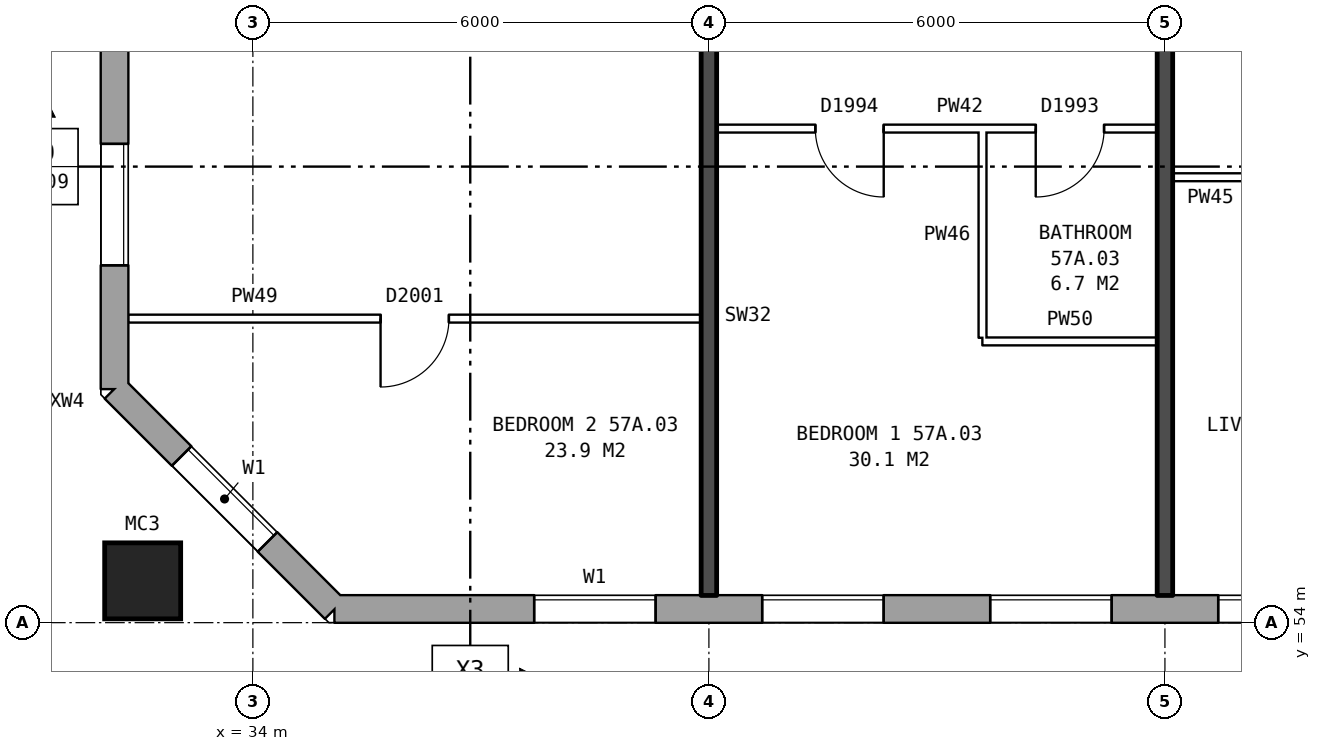
"""IFC4 building model, lengths in metres.
Left out: names, types, materials, properties, quantities, classifications, styles, units other than length and angle.
Written with IfcOpenShell. Run it as: python <this file> out.ifc"""

import sys

from ifc_helpers import new_model, si_unit, direction, frame, frame_2d, origin, origin_2d, place, context, subcontext, project, spatial, rectangle, hollow_rectangle, extrude, element, fill, save


model = new_model("IFC4")
c1 = context("Model", 3, precision=1e-05, world=origin(), true_north=direction((0.0, 1.0)))
c2 = subcontext(c1, "Body", "Model", "MODEL_VIEW")
j1 = project(units=[si_unit("LENGTHUNIT", "METRE"), si_unit("PLANEANGLEUNIT", "RADIAN")], contexts=[c1])
p1 = place(None, origin())
s1 = spatial("IfcSite", under=j1, at=p1, CompositionType="ELEMENT")
p2 = place(p1, origin())
s2 = spatial("IfcBuilding", under=s1, at=p2, CompositionType="ELEMENT")
p3 = place(p2, frame((0.0, 0.0, 202.8)))
s3 = spatial("IfcBuildingStorey", under=s2, at=p3, CompositionType="ELEMENT", Elevation=202.8)
p4 = place(p3, frame((32.55, 54.55, 0.0), z_axis=(0.0, 0.0, 1.0), x_axis=(1.0, 0.0, 0.0)))
e1 = element("IfcColumn", 1, at=p4, inside=s3, PredefinedType="COLUMN", context=c2, shape_type="SweptSolid", body=[
    extrude(hollow_rectangle(XDim=1.0, YDim=1.0, WallThickness=0.055, at=origin_2d()), origin(), (0.0, 0.0, 1.0), 3.1),
])
p5 = place(p3, frame((32.18, 57.075, 0.0), z_axis=(0.0, 0.0, 1.0), x_axis=(0.707106781187, -0.707106781187, 0.0)))
e2 = element("IfcWall", 2, at=p5, inside=s3, PredefinedType="STANDARD", context=c2, shape_type="SweptSolid", body=[
    extrude(rectangle(XDim=4.094, YDim=0.36, at=frame_2d((2.047, 0.0))), origin(), (0.0, 0.0, 1.0), 2.85),
])
p6 = place(p5, frame((1.247, 0.0, 0.8)))
e3 = element("IfcOpeningElement", 3, at=p6, cuts=e2, PredefinedType="OPENING", context=c2, shape_type="SweptSolid", body=[
    extrude(rectangle(XDim=1.6, YDim=1.8, at=frame_2d((0.8, 0.9))), frame((0.0, 0.19, 0.0), z_axis=(0.0, -1.0, 0.0), x_axis=(1.0, 0.0, 0.0)), (0.0, 0.0, 1.0), 0.38),
])
p7 = place(p3, frame((35.075, 54.18, 0.0), z_axis=(0.0, 0.0, 1.0), x_axis=(1.0, 0.0, 0.0)))
e4 = element("IfcWall", 4, at=p7, inside=s3, PredefinedType="STANDARD", context=c2, shape_type="SweptSolid", body=[
    extrude(rectangle(XDim=39.875, YDim=0.36, at=frame_2d((19.938, 0.0))), origin(), (0.0, 0.0, 1.0), 2.85),
])
p8 = place(p7, frame((2.625, 0.0, 0.8)))
e5 = element("IfcOpeningElement", 5, at=p8, cuts=e4, PredefinedType="OPENING", context=c2, shape_type="SweptSolid", body=[
    extrude(rectangle(XDim=1.6, YDim=1.8, at=frame_2d((0.8, 0.9))), frame((0.0, 0.19, 0.0), z_axis=(0.0, -1.0, 0.0), x_axis=(1.0, 0.0, 0.0)), (0.0, 0.0, 1.0), 0.38),
])
p9 = place(p7, frame((5.625, 0.0, 0.8)))
e6 = element("IfcOpeningElement", 6, at=p9, cuts=e4, PredefinedType="OPENING", context=c2, shape_type="SweptSolid", body=[
    extrude(rectangle(XDim=1.6, YDim=1.8, at=frame_2d((0.8, 0.9))), frame((0.0, 0.19, 0.0), z_axis=(0.0, -1.0, 0.0), x_axis=(1.0, 0.0, 0.0)), (0.0, 0.0, 1.0), 0.38),
])
p10 = place(p7, frame((8.625, 0.0, 0.8)))
e7 = element("IfcOpeningElement", 7, at=p10, cuts=e4, PredefinedType="OPENING", context=c2, shape_type="SweptSolid", body=[
    extrude(rectangle(XDim=1.6, YDim=1.8, at=frame_2d((0.8, 0.9))), frame((0.0, 0.19, 0.0), z_axis=(0.0, -1.0, 0.0), x_axis=(1.0, 0.0, 0.0)), (0.0, 0.0, 1.0), 0.38),
])
p11 = place(p7, frame((11.625, 0.0, 0.8)))
e8 = element("IfcOpeningElement", 8, at=p11, cuts=e4, PredefinedType="OPENING", context=c2, shape_type="SweptSolid", body=[
    extrude(rectangle(XDim=1.6, YDim=1.8, at=frame_2d((0.8, 0.9))), frame((0.0, 0.19, 0.0), z_axis=(0.0, -1.0, 0.0), x_axis=(1.0, 0.0, 0.0)), (0.0, 0.0, 1.0), 0.38),
])
p12 = place(p7, frame((14.625, 0.0, 0.8)))
e9 = element("IfcOpeningElement", 9, at=p12, cuts=e4, PredefinedType="OPENING", context=c2, shape_type="SweptSolid", body=[
    extrude(rectangle(XDim=1.6, YDim=1.8, at=frame_2d((0.8, 0.9))), frame((0.0, 0.19, 0.0), z_axis=(0.0, -1.0, 0.0), x_axis=(1.0, 0.0, 0.0)), (0.0, 0.0, 1.0), 0.38),
])
p13 = place(p7, frame((17.625, 0.0, 0.8)))
e10 = element("IfcOpeningElement", 10, at=p13, cuts=e4, PredefinedType="OPENING", context=c2, shape_type="SweptSolid", body=[
    extrude(rectangle(XDim=1.6, YDim=1.8, at=frame_2d((0.8, 0.9))), frame((0.0, 0.19, 0.0), z_axis=(0.0, -1.0, 0.0), x_axis=(1.0, 0.0, 0.0)), (0.0, 0.0, 1.0), 0.38),
])
p14 = place(p7, frame((20.625, 0.0, 0.8)))
e11 = element("IfcOpeningElement", 11, at=p14, cuts=e4, PredefinedType="OPENING", context=c2, shape_type="SweptSolid", body=[
    extrude(rectangle(XDim=1.6, YDim=1.8, at=frame_2d((0.8, 0.9))), frame((0.0, 0.19, 0.0), z_axis=(0.0, -1.0, 0.0), x_axis=(1.0, 0.0, 0.0)), (0.0, 0.0, 1.0), 0.38),
])
p15 = place(p7, frame((23.625, 0.0, 0.8)))
e12 = element("IfcOpeningElement", 12, at=p15, cuts=e4, PredefinedType="OPENING", context=c2, shape_type="SweptSolid", body=[
    extrude(rectangle(XDim=1.6, YDim=1.8, at=frame_2d((0.8, 0.9))), frame((0.0, 0.19, 0.0), z_axis=(0.0, -1.0, 0.0), x_axis=(1.0, 0.0, 0.0)), (0.0, 0.0, 1.0), 0.38),
])
p16 = place(p7, frame((26.625, 0.0, 0.8)))
e13 = element("IfcOpeningElement", 13, at=p16, cuts=e4, PredefinedType="OPENING", context=c2, shape_type="SweptSolid", body=[
    extrude(rectangle(XDim=1.6, YDim=1.8, at=frame_2d((0.8, 0.9))), frame((0.0, 0.19, 0.0), z_axis=(0.0, -1.0, 0.0), x_axis=(1.0, 0.0, 0.0)), (0.0, 0.0, 1.0), 0.38),
])
p17 = place(p7, frame((29.625, 0.0, 0.8)))
e14 = element("IfcOpeningElement", 14, at=p17, cuts=e4, PredefinedType="OPENING", context=c2, shape_type="SweptSolid", body=[
    extrude(rectangle(XDim=1.6, YDim=1.8, at=frame_2d((0.8, 0.9))), frame((0.0, 0.19, 0.0), z_axis=(0.0, -1.0, 0.0), x_axis=(1.0, 0.0, 0.0)), (0.0, 0.0, 1.0), 0.38),
])
p18 = place(p7, frame((32.625, 0.0, 0.8)))
e15 = element("IfcOpeningElement", 15, at=p18, cuts=e4, PredefinedType="OPENING", context=c2, shape_type="SweptSolid", body=[
    extrude(rectangle(XDim=1.6, YDim=1.8, at=frame_2d((0.8, 0.9))), frame((0.0, 0.19, 0.0), z_axis=(0.0, -1.0, 0.0), x_axis=(1.0, 0.0, 0.0)), (0.0, 0.0, 1.0), 0.38),
])
p19 = place(p7, frame((35.625, 0.0, 0.8)))
e16 = element("IfcOpeningElement", 16, at=p19, cuts=e4, PredefinedType="OPENING", context=c2, shape_type="SweptSolid", body=[
    extrude(rectangle(XDim=1.6, YDim=1.8, at=frame_2d((0.8, 0.9))), frame((0.0, 0.19, 0.0), z_axis=(0.0, -1.0, 0.0), x_axis=(1.0, 0.0, 0.0)), (0.0, 0.0, 1.0), 0.38),
])
p20 = place(p3, frame((32.18, 82.925, 0.0), z_axis=(0.0, 0.0, 1.0), x_axis=(0.0, -1.0, 0.0)))
e17 = element("IfcWall", 17, at=p20, inside=s3, PredefinedType="STANDARD", context=c2, shape_type="SweptSolid", body=[
    extrude(rectangle(XDim=25.851, YDim=0.36, at=frame_2d((12.925, 0.0))), origin(), (0.0, 0.0, 1.0), 2.85),
])
p21 = place(p20, frame((1.625, 0.0, 0.8)))
e18 = element("IfcOpeningElement", 18, at=p21, cuts=e17, PredefinedType="OPENING", context=c2, shape_type="SweptSolid", body=[
    extrude(rectangle(XDim=1.6, YDim=1.8, at=frame_2d((0.8, 0.9))), frame((0.0, 0.19, 0.0), z_axis=(0.0, -1.0, 0.0), x_axis=(1.0, 0.0, 0.0)), (0.0, 0.0, 1.0), 0.38),
])
p22 = place(p20, frame((4.625, 0.0, 0.8)))
e19 = element("IfcOpeningElement", 19, at=p22, cuts=e17, PredefinedType="OPENING", context=c2, shape_type="SweptSolid", body=[
    extrude(rectangle(XDim=1.6, YDim=1.8, at=frame_2d((0.8, 0.9))), frame((0.0, 0.19, 0.0), z_axis=(0.0, -1.0, 0.0), x_axis=(1.0, 0.0, 0.0)), (0.0, 0.0, 1.0), 0.38),
])
p23 = place(p20, frame((19.625, 0.0, 0.8)))
e20 = element("IfcOpeningElement", 20, at=p23, cuts=e17, PredefinedType="OPENING", context=c2, shape_type="SweptSolid", body=[
    extrude(rectangle(XDim=1.6, YDim=1.8, at=frame_2d((0.8, 0.9))), frame((0.0, 0.19, 0.0), z_axis=(0.0, -1.0, 0.0), x_axis=(1.0, 0.0, 0.0)), (0.0, 0.0, 1.0), 0.38),
])
p24 = place(p20, frame((22.625, 0.0, 0.8)))
e21 = element("IfcOpeningElement", 21, at=p24, cuts=e17, PredefinedType="OPENING", context=c2, shape_type="SweptSolid", body=[
    extrude(rectangle(XDim=1.6, YDim=1.8, at=frame_2d((0.8, 0.9))), frame((0.0, 0.19, 0.0), z_axis=(0.0, -1.0, 0.0), x_axis=(1.0, 0.0, 0.0)), (0.0, 0.0, 1.0), 0.38),
])
p25 = place(p3, frame((43.6, 57.7, 0.0), z_axis=(0.0, 0.0, 1.0), x_axis=(1.0, 0.0, 0.0)))
e22 = element("IfcWall", 22, at=p25, inside=s3, PredefinedType="PARTITIONING", context=c2, shape_type="SweptSolid", body=[
    extrude(rectangle(XDim=2.3, YDim=0.1, at=frame_2d((1.15, 0.0))), origin(), (0.0, 0.0, 1.0), 2.85),
])
p26 = place(p3, frame((32.36, 58.0, 0.0), z_axis=(0.0, 0.0, 1.0), x_axis=(1.0, 0.0, 0.0)))
e23 = element("IfcWall", 23, at=p26, inside=s3, PredefinedType="PARTITIONING", context=c2, shape_type="SweptSolid", body=[
    extrude(rectangle(XDim=7.54, YDim=0.1, at=frame_2d((3.77, 0.0))), origin(), (0.0, 0.0, 1.0), 2.85),
])
p27 = place(p26, frame((3.32, 0.0, 0.0)))
e24 = element("IfcOpeningElement", 24, at=p27, cuts=e23, PredefinedType="OPENING", context=c2, shape_type="SweptSolid", body=[
    extrude(rectangle(XDim=0.9, YDim=2.1, at=frame_2d((0.45, 1.05))), frame((0.0, 0.06, 0.0), z_axis=(0.0, -1.0, 0.0), x_axis=(1.0, 0.0, 0.0)), (0.0, 0.0, 1.0), 0.12),
])
p28 = place(p3, frame((46.1, 59.86, 0.0), z_axis=(0.0, 0.0, 1.0), x_axis=(1.0, 0.0, 0.0)))
e25 = element("IfcWall", 25, at=p28, inside=s3, PredefinedType="PARTITIONING", context=c2, shape_type="SweptSolid", body=[
    extrude(rectangle(XDim=2.9, YDim=0.1, at=frame_2d((1.45, 0.0))), origin(), (0.0, 0.0, 1.0), 2.85),
])
p29 = place(p28, frame((1.0, 0.0, 0.0)))
e26 = element("IfcOpeningElement", 26, at=p29, cuts=e25, PredefinedType="OPENING", context=c2, shape_type="SweptSolid", body=[
    extrude(rectangle(XDim=0.9, YDim=2.1, at=frame_2d((0.45, 1.05))), frame((0.0, 0.06, 0.0), z_axis=(0.0, -1.0, 0.0), x_axis=(1.0, 0.0, 0.0)), (0.0, 0.0, 1.0), 0.12),
])
p30 = place(p3, frame((40.1, 60.5, 0.0), z_axis=(0.0, 0.0, 1.0), x_axis=(1.0, 0.0, 0.0)))
e27 = element("IfcWall", 27, at=p30, inside=s3, PredefinedType="PARTITIONING", context=c2, shape_type="SweptSolid", body=[
    extrude(rectangle(XDim=5.8, YDim=0.1, at=frame_2d((2.9, 0.0))), origin(), (0.0, 0.0, 1.0), 2.85),
])
p31 = place(p30, frame((1.3, 0.0, 0.0)))
e28 = element("IfcOpeningElement", 28, at=p31, cuts=e27, PredefinedType="OPENING", context=c2, shape_type="SweptSolid", body=[
    extrude(rectangle(XDim=0.9, YDim=2.1, at=frame_2d((0.45, 1.05))), frame((0.0, 0.06, 0.0), z_axis=(0.0, -1.0, 0.0), x_axis=(1.0, 0.0, 0.0)), (0.0, 0.0, 1.0), 0.12),
])
p32 = place(p30, frame((4.2, 0.0, 0.0)))
e29 = element("IfcOpeningElement", 29, at=p32, cuts=e27, PredefinedType="OPENING", context=c2, shape_type="SweptSolid", body=[
    extrude(rectangle(XDim=0.9, YDim=2.1, at=frame_2d((0.45, 1.05))), frame((0.0, 0.06, 0.0), z_axis=(0.0, -1.0, 0.0), x_axis=(1.0, 0.0, 0.0)), (0.0, 0.0, 1.0), 0.12),
])
p33 = place(p3, frame((40.0, 54.36, 0.0), z_axis=(0.0, 0.0, 1.0), x_axis=(0.0, 1.0, 0.0)))
e30 = element("IfcWall", 30, at=p33, inside=s3, PredefinedType="SOLIDWALL", context=c2, shape_type="SweptSolid", body=[
    extrude(rectangle(XDim=9.44, YDim=0.2, at=frame_2d((4.72, 0.0))), origin(), (0.0, 0.0, 1.0), 2.85),
])
p34 = place(p33, frame((7.34, 0.0, 0.0)))
e31 = element("IfcOpeningElement", 31, at=p34, cuts=e30, PredefinedType="OPENING", context=c2, shape_type="SweptSolid", body=[
    extrude(rectangle(XDim=0.9, YDim=2.1, at=frame_2d((0.45, 1.05))), frame((0.0, 0.11, 0.0), z_axis=(0.0, -1.0, 0.0), x_axis=(1.0, 0.0, 0.0)), (0.0, 0.0, 1.0), 0.22),
])
p35 = place(p3, frame((43.6, 57.75, 0.0), z_axis=(0.0, 0.0, 1.0), x_axis=(0.0, 1.0, 0.0)))
e32 = element("IfcWall", 32, at=p35, inside=s3, PredefinedType="PARTITIONING", context=c2, shape_type="SweptSolid", body=[
    extrude(rectangle(XDim=2.7, YDim=0.1, at=frame_2d((1.35, 0.0))), origin(), (0.0, 0.0, 1.0), 2.85),
])
p36 = place(p3, frame((46.0, 54.36, 0.0), z_axis=(0.0, 0.0, 1.0), x_axis=(0.0, 1.0, 0.0)))
e33 = element("IfcWall", 33, at=p36, inside=s3, PredefinedType="SOLIDWALL", context=c2, shape_type="SweptSolid", body=[
    extrude(rectangle(XDim=14.44, YDim=0.2, at=frame_2d((7.22, 0.0))), origin(), (0.0, 0.0, 1.0), 2.85),
])
p37 = place(p6, origin())
e34 = element("IfcWindow", 34, at=p37, inside=s3, PartitioningType="SINGLE_PANEL", PredefinedType="WINDOW", context=c2, shape_type="SweptSolid", body=[
    extrude(rectangle(XDim=1.6, YDim=1.8, at=frame_2d((0.8, 0.9))), frame((0.0, 0.15, 0.0), z_axis=(0.0, -1.0, 0.0), x_axis=(1.0, 0.0, 0.0)), (0.0, 0.0, 1.0), 0.06),
])
fill(e3, e34)
p38 = place(p8, origin())
e35 = element("IfcWindow", 35, at=p38, inside=s3, PartitioningType="SINGLE_PANEL", PredefinedType="WINDOW", context=c2, shape_type="SweptSolid", body=[
    extrude(rectangle(XDim=1.6, YDim=1.8, at=frame_2d((0.8, 0.9))), frame((0.0, 0.15, 0.0), z_axis=(0.0, -1.0, 0.0), x_axis=(1.0, 0.0, 0.0)), (0.0, 0.0, 1.0), 0.06),
])
fill(e5, e35)
p39 = place(p9, origin())
e36 = element("IfcWindow", 36, at=p39, inside=s3, PartitioningType="SINGLE_PANEL", PredefinedType="WINDOW", context=c2, shape_type="SweptSolid", body=[
    extrude(rectangle(XDim=1.6, YDim=1.8, at=frame_2d((0.8, 0.9))), frame((0.0, 0.15, 0.0), z_axis=(0.0, -1.0, 0.0), x_axis=(1.0, 0.0, 0.0)), (0.0, 0.0, 1.0), 0.06),
])
fill(e6, e36)
p40 = place(p10, origin())
e37 = element("IfcWindow", 37, at=p40, inside=s3, PartitioningType="SINGLE_PANEL", PredefinedType="WINDOW", context=c2, shape_type="SweptSolid", body=[
    extrude(rectangle(XDim=1.6, YDim=1.8, at=frame_2d((0.8, 0.9))), frame((0.0, 0.15, 0.0), z_axis=(0.0, -1.0, 0.0), x_axis=(1.0, 0.0, 0.0)), (0.0, 0.0, 1.0), 0.06),
])
fill(e7, e37)
p41 = place(p11, origin())
e38 = element("IfcWindow", 38, at=p41, inside=s3, PartitioningType="SINGLE_PANEL", PredefinedType="WINDOW", context=c2, shape_type="SweptSolid", body=[
    extrude(rectangle(XDim=1.6, YDim=1.8, at=frame_2d((0.8, 0.9))), frame((0.0, 0.15, 0.0), z_axis=(0.0, -1.0, 0.0), x_axis=(1.0, 0.0, 0.0)), (0.0, 0.0, 1.0), 0.06),
])
fill(e8, e38)
p42 = place(p24, origin())
e39 = element("IfcWindow", 39, at=p42, inside=s3, PartitioningType="SINGLE_PANEL", PredefinedType="WINDOW", context=c2, shape_type="SweptSolid", body=[
    extrude(rectangle(XDim=1.6, YDim=1.8, at=frame_2d((0.8, 0.9))), frame((0.0, 0.15, 0.0), z_axis=(0.0, -1.0, 0.0), x_axis=(1.0, 0.0, 0.0)), (0.0, 0.0, 1.0), 0.06),
])
fill(e21, e39)
p43 = place(p31, frame((0.9, 0.0, 0.0), z_axis=(0.0, 0.0, 1.0), x_axis=(-1.0, 0.0, 0.0)))
e40 = element("IfcDoor", 40, at=p43, inside=s3, OperationType="SINGLE_SWING_LEFT", PredefinedType="DOOR", context=c2, shape_type="SweptSolid", body=[
    extrude(rectangle(XDim=0.9, YDim=2.1, at=frame_2d((0.45, 1.05))), frame((0.0, 0.025, 0.0), z_axis=(0.0, -1.0, 0.0), x_axis=(1.0, 0.0, 0.0)), (0.0, 0.0, 1.0), 0.05),
])
fill(e28, e40)
p44 = place(p27, frame((0.9, 0.0, 0.0), z_axis=(0.0, 0.0, 1.0), x_axis=(-1.0, 0.0, 0.0)))
e41 = element("IfcDoor", 41, at=p44, inside=s3, OperationType="SINGLE_SWING_RIGHT", PredefinedType="DOOR", context=c2, shape_type="SweptSolid", body=[
    extrude(rectangle(XDim=0.9, YDim=2.1, at=frame_2d((0.45, 1.05))), frame((0.0, 0.025, 0.0), z_axis=(0.0, -1.0, 0.0), x_axis=(1.0, 0.0, 0.0)), (0.0, 0.0, 1.0), 0.05),
])
fill(e24, e41)
p45 = place(p32, frame((0.9, 0.0, 0.0), z_axis=(0.0, 0.0, 1.0), x_axis=(-1.0, 0.0, 0.0)))
e42 = element("IfcDoor", 42, at=p45, inside=s3, OperationType="SINGLE_SWING_RIGHT", PredefinedType="DOOR", context=c2, shape_type="SweptSolid", body=[
    extrude(rectangle(XDim=0.9, YDim=2.1, at=frame_2d((0.45, 1.05))), frame((0.0, 0.025, 0.0), z_axis=(0.0, -1.0, 0.0), x_axis=(1.0, 0.0, 0.0)), (0.0, 0.0, 1.0), 0.05),
])
fill(e29, e42)
save(model, sys.argv[1])
